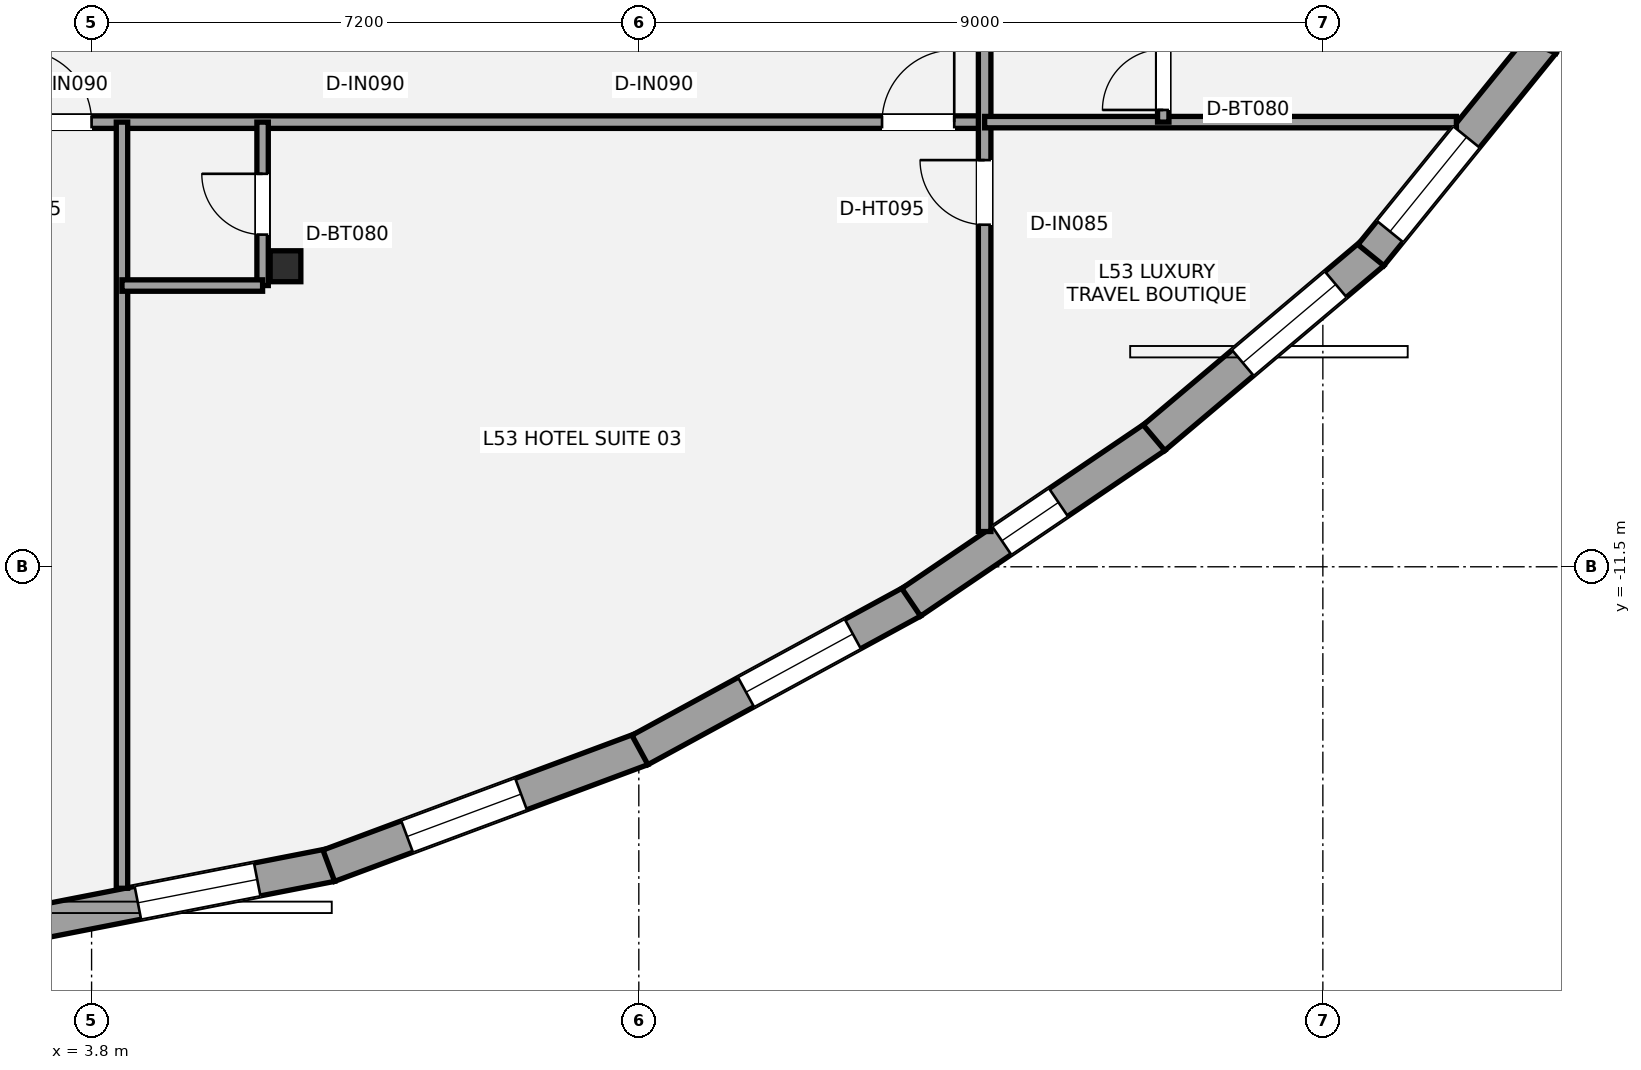
"""IFC4 building model, lengths in metres.
Left out: names, types, materials, properties, quantities, classifications, styles, units other than length and angle.
Written with IfcOpenShell. Run it as: python <this file> out.ifc"""

import sys

from ifc_helpers import new_model, si_unit, direction, frame, frame_2d, origin, origin_2d, place, context, subcontext, project, spatial, rectangle, i_section, extrude, element, fill, save


model = new_model("IFC4")
c1 = context("Model", 3, precision=1e-05, world=origin(), true_north=direction((0.0, 1.0)))
c2 = subcontext(c1, "Body", "Model", "MODEL_VIEW")
j1 = project(units=[si_unit("LENGTHUNIT", "METRE"), si_unit("PLANEANGLEUNIT", "RADIAN")], contexts=[c1])
p1 = place(None, origin())
s1 = spatial("IfcSite", under=j1, at=p1, CompositionType="ELEMENT")
p2 = place(p1, origin())
s2 = spatial("IfcBuilding", under=s1, at=p2, CompositionType="ELEMENT")
p3 = place(p2, frame((0.0, 0.0, 191.8)))
s3 = spatial("IfcBuildingStorey", under=s2, at=p3, CompositionType="ELEMENT", Elevation=191.8)
p4 = place(p3, frame((6.351, -7.546, 0.0), z_axis=(0.0, 0.0, 1.0), x_axis=(1.0, 0.0, 0.0)))
e1 = element("IfcColumn", 1, at=p4, inside=s3, PredefinedType="COLUMN", context=c2, shape_type="SweptSolid", body=[
    extrude(i_section(OverallWidth=0.404, OverallDepth=0.407, WebThickness=0.027, FlangeThickness=0.044, at=origin_2d()), origin(), (0.0, 0.0, 1.0), 3.2),
])
p5 = place(p3, frame((6.955, -15.423, 0.0), z_axis=(0.0, 0.0, 1.0), x_axis=(-0.981406109785, -0.191942823979, 0.0)))
e2 = element("IfcWall", 2, at=p5, inside=s3, PredefinedType="STANDARD", context=c2, shape_type="SweptSolid", body=[
    extrude(rectangle(XDim=4.682, YDim=0.44, at=frame_2d((2.341, 0.0))), origin(), (0.0, 0.0, 1.0), 2.315),
])
p6 = place(p5, frame((0.995, 0.0, 0.58)))
e3 = element("IfcOpeningElement", 3, at=p6, cuts=e2, PredefinedType="OPENING", context=c2, shape_type="SweptSolid", body=[
    extrude(rectangle(XDim=1.6, YDim=1.55, at=frame_2d((0.8, 0.775))), frame((0.0, 0.23, 0.0), z_axis=(0.0, -1.0, 0.0), x_axis=(1.0, 0.0, 0.0)), (0.0, 0.0, 1.0), 0.46),
])
p7 = place(p3, frame((11.042, -13.897, 0.0), z_axis=(0.0, 0.0, 1.0), x_axis=(-0.937088879832, -0.349090863953, 0.0)))
e4 = element("IfcWall", 4, at=p7, inside=s3, PredefinedType="STANDARD", context=c2, shape_type="SweptSolid", body=[
    extrude(rectangle(XDim=4.398, YDim=0.44, at=frame_2d((2.199, 0.0))), origin(), (0.0, 0.0, 1.0), 2.315),
])
p8 = place(p7, frame((1.699, 0.0, 0.58)))
e5 = element("IfcOpeningElement", 5, at=p8, cuts=e4, PredefinedType="OPENING", context=c2, shape_type="SweptSolid", body=[
    extrude(rectangle(XDim=1.6, YDim=1.55, at=frame_2d((0.8, 0.775))), frame((0.0, 0.23, 0.0), z_axis=(0.0, -1.0, 0.0), x_axis=(1.0, 0.0, 0.0)), (0.0, 0.0, 1.0), 0.46),
])
p9 = place(p3, frame((14.602, -11.956, 0.0), z_axis=(0.0, 0.0, 1.0), x_axis=(-0.878158075839, -0.478370561217, 0.0)))
e6 = element("IfcWall", 6, at=p9, inside=s3, PredefinedType="STANDARD", context=c2, shape_type="SweptSolid", body=[
    extrude(rectangle(XDim=4.085, YDim=0.44, at=frame_2d((2.043, 0.0))), origin(), (0.0, 0.0, 1.0), 2.315),
])
p10 = place(p9, frame((0.895, 0.0, 0.58)))
e7 = element("IfcOpeningElement", 7, at=p10, cuts=e6, PredefinedType="OPENING", context=c2, shape_type="SweptSolid", body=[
    extrude(rectangle(XDim=1.6, YDim=1.55, at=frame_2d((0.8, 0.775))), frame((0.0, 0.23, 0.0), z_axis=(0.0, -1.0, 0.0), x_axis=(1.0, 0.0, 0.0)), (0.0, 0.0, 1.0), 0.46),
])
p11 = place(p3, frame((17.797, -9.788, 0.0), z_axis=(0.0, 0.0, 1.0), x_axis=(-0.827690675663, -0.561184591218, 0.0)))
e8 = element("IfcWall", 8, at=p11, inside=s3, PredefinedType="STANDARD", context=c2, shape_type="SweptSolid", body=[
    extrude(rectangle(XDim=3.882, YDim=0.44, at=frame_2d((1.941, 0.0))), origin(), (0.0, 0.0, 1.0), 2.315),
])
p12 = place(p11, frame((1.541, 0.0, 0.58)))
e9 = element("IfcOpeningElement", 9, at=p12, cuts=e8, PredefinedType="OPENING", context=c2, shape_type="SweptSolid", body=[
    extrude(rectangle(XDim=0.9, YDim=1.35, at=frame_2d((0.45, 0.675))), frame((0.0, 0.23, 0.0), z_axis=(0.0, -1.0, 0.0), x_axis=(1.0, 0.0, 0.0)), (0.0, 0.0, 1.0), 0.46),
])
p13 = place(p3, frame((20.661, -7.37, 0.0), z_axis=(0.0, 0.0, 1.0), x_axis=(-0.764269547527, -0.644896936512, 0.0)))
e10 = element("IfcWall", 10, at=p13, inside=s3, PredefinedType="STANDARD", context=c2, shape_type="SweptSolid", body=[
    extrude(rectangle(XDim=3.771, YDim=0.44, at=frame_2d((1.886, 0.0))), origin(), (0.0, 0.0, 1.0), 2.315),
])
p14 = place(p13, frame((0.643, 0.0, 0.58)))
e11 = element("IfcOpeningElement", 11, at=p14, cuts=e10, PredefinedType="OPENING", context=c2, shape_type="SweptSolid", body=[
    extrude(rectangle(XDim=1.6, YDim=1.55, at=frame_2d((0.8, 0.775))), frame((0.0, 0.23, 0.0), z_axis=(0.0, -1.0, 0.0), x_axis=(1.0, 0.0, 0.0)), (0.0, 0.0, 1.0), 0.46),
])
p15 = place(p3, frame((22.897, -4.605, 0.0), z_axis=(0.0, 0.0, 1.0), x_axis=(-0.629697919329, -0.776840093193, 0.0)))
e12 = element("IfcWall", 12, at=p15, inside=s3, PredefinedType="STANDARD", context=c2, shape_type="SweptSolid", body=[
    extrude(rectangle(XDim=3.597, YDim=0.44, at=frame_2d((1.799, 0.0))), origin(), (0.0, 0.0, 1.0), 2.315),
])
p16 = place(p15, frame((1.597, 0.0, 0.58)))
e13 = element("IfcOpeningElement", 13, at=p16, cuts=e12, PredefinedType="OPENING", context=c2, shape_type="SweptSolid", body=[
    extrude(rectangle(XDim=1.6, YDim=1.55, at=frame_2d((0.8, 0.775))), frame((0.0, 0.23, 0.0), z_axis=(0.0, -1.0, 0.0), x_axis=(1.0, 0.0, 0.0)), (0.0, 0.0, 1.0), 0.46),
])
p17 = place(p3, frame((24.191, -1.543, 0.0), z_axis=(0.0, 0.0, 1.0), x_axis=(-0.391568154721, -0.920149107595, 0.0)))
e14 = element("IfcWall", 14, at=p17, inside=s3, PredefinedType="STANDARD", context=c2, shape_type="SweptSolid", body=[
    extrude(rectangle(XDim=3.385, YDim=0.44, at=frame_2d((1.693, 0.0))), origin(), (0.0, 0.0, 1.0), 2.315),
])
p18 = place(p17, frame((0.398, 0.0, 0.58)))
e15 = element("IfcOpeningElement", 15, at=p18, cuts=e14, PredefinedType="OPENING", context=c2, shape_type="SweptSolid", body=[
    extrude(rectangle(XDim=1.6, YDim=1.55, at=frame_2d((0.8, 0.775))), frame((0.0, 0.23, 0.0), z_axis=(0.0, -1.0, 0.0), x_axis=(1.0, 0.0, 0.0)), (0.0, 0.0, 1.0), 0.46),
])
p19 = place(p3, frame((-16.1, -5.65, 0.0), z_axis=(0.0, 0.0, 1.0), x_axis=(1.0, 0.0, 0.0)))
e16 = element("IfcWall", 16, at=p19, inside=s3, PredefinedType="PARTITIONING", context=c2, shape_type="SweptSolid", body=[
    extrude(rectangle(XDim=31.65, YDim=0.165, at=frame_2d((15.825, 0.0))), origin(), (0.0, 0.0, 1.0), 2.398),
])
p20 = place(p19, frame((8.95, 0.0, 0.0)))
e17 = element("IfcOpeningElement", 17, at=p20, cuts=e16, PredefinedType="OPENING", context=c2, shape_type="SweptSolid", body=[
    extrude(rectangle(XDim=0.95, YDim=2.15, at=frame_2d((0.475, 1.075))), frame((0.0, 0.093, 0.0), z_axis=(0.0, -1.0, 0.0), x_axis=(1.0, 0.0, 0.0)), (0.0, 0.0, 1.0), 0.185),
])
p21 = place(p19, frame((18.95, 0.0, 0.0)))
e18 = element("IfcOpeningElement", 18, at=p21, cuts=e16, PredefinedType="OPENING", context=c2, shape_type="SweptSolid", body=[
    extrude(rectangle(XDim=0.95, YDim=2.15, at=frame_2d((0.475, 1.075))), frame((0.0, 0.093, 0.0), z_axis=(0.0, -1.0, 0.0), x_axis=(1.0, 0.0, 0.0)), (0.0, 0.0, 1.0), 0.185),
])
p22 = place(p19, frame((30.3, 0.0, 0.0)))
e19 = element("IfcOpeningElement", 19, at=p22, cuts=e16, PredefinedType="OPENING", context=c2, shape_type="SweptSolid", body=[
    extrude(rectangle(XDim=0.95, YDim=2.15, at=frame_2d((0.475, 1.075))), frame((0.0, 0.093, 0.0), z_axis=(0.0, -1.0, 0.0), x_axis=(1.0, 0.0, 0.0)), (0.0, 0.0, 1.0), 0.185),
])
p23 = place(p3, frame((15.55, -11.036, 0.0), z_axis=(0.0, 0.0, 1.0), x_axis=(0.0, 1.0, 0.0)))
e20 = element("IfcWall", 20, at=p23, inside=s3, PredefinedType="PARTITIONING", context=c2, shape_type="SweptSolid", body=[
    extrude(rectangle(XDim=18.586, YDim=0.165, at=frame_2d((9.293, 0.0))), origin(), (0.0, 0.0, 1.0), 2.473),
])
p24 = place(p23, frame((4.037, 0.0, 0.0)))
e21 = element("IfcOpeningElement", 21, at=p24, cuts=e20, PredefinedType="OPENING", context=c2, shape_type="SweptSolid", body=[
    extrude(rectangle(XDim=0.85, YDim=2.1, at=frame_2d((0.425, 1.05))), frame((0.0, 0.093, 0.0), z_axis=(0.0, -1.0, 0.0), x_axis=(1.0, 0.0, 0.0)), (0.0, 0.0, 1.0), 0.185),
])
p25 = place(p23, frame((8.086, 0.0, 0.0)))
e22 = element("IfcOpeningElement", 22, at=p25, cuts=e20, PredefinedType="OPENING", context=c2, shape_type="SweptSolid", body=[
    extrude(rectangle(XDim=0.95, YDim=2.15, at=frame_2d((0.475, 1.075))), frame((0.0, 0.093, 0.0), z_axis=(0.0, -1.0, 0.0), x_axis=(1.0, 0.0, 0.0)), (0.0, 0.0, 1.0), 0.185),
])
p26 = place(p23, frame((12.487, 0.0, 0.0)))
e23 = element("IfcOpeningElement", 23, at=p26, cuts=e20, PredefinedType="OPENING", context=c2, shape_type="SweptSolid", body=[
    extrude(rectangle(XDim=0.95, YDim=2.15, at=frame_2d((0.475, 1.075))), frame((0.0, 0.093, 0.0), z_axis=(0.0, -1.0, 0.0), x_axis=(1.0, 0.0, 0.0)), (0.0, 0.0, 1.0), 0.185),
])
p27 = place(p23, frame((17.237, 0.0, 0.0)))
e24 = element("IfcOpeningElement", 24, at=p27, cuts=e20, PredefinedType="OPENING", context=c2, shape_type="SweptSolid", body=[
    extrude(rectangle(XDim=0.95, YDim=2.15, at=frame_2d((0.475, 1.075))), frame((0.0, 0.093, 0.0), z_axis=(0.0, -1.0, 0.0), x_axis=(1.0, 0.0, 0.0)), (0.0, 0.0, 1.0), 0.185),
])
p28 = place(p3, frame((15.55, -5.65, 0.0), z_axis=(0.0, 0.0, 1.0), x_axis=(1.0, 0.0, 0.0)))
e25 = element("IfcWall", 25, at=p28, inside=s3, PredefinedType="PLUMBINGWALL", context=c2, shape_type="SweptSolid", body=[
    extrude(rectangle(XDim=6.207, YDim=0.15, at=frame_2d((3.104, 0.0))), origin(), (0.0, 0.0, 1.0), 2.473),
])
p29 = place(p3, frame((4.2, -15.729, 0.0), z_axis=(0.0, 0.0, 1.0), x_axis=(0.0, 1.0, 0.0)))
e26 = element("IfcWall", 26, at=p29, inside=s3, PredefinedType="PLUMBINGWALL", context=c2, shape_type="SweptSolid", body=[
    extrude(rectangle(XDim=10.08, YDim=0.15, at=frame_2d((5.04, 0.0))), origin(), (0.0, 0.0, 1.0), 2.473),
])
p30 = place(p3, frame((6.05, -7.8, 0.0), z_axis=(0.0, 0.0, 1.0), x_axis=(0.0, 1.0, 0.0)))
e27 = element("IfcWall", 27, at=p30, inside=s3, PredefinedType="PLUMBINGWALL", context=c2, shape_type="SweptSolid", body=[
    extrude(rectangle(XDim=2.15, YDim=0.15, at=frame_2d((1.075, 0.0))), origin(), (0.0, 0.0, 1.0), 2.473),
])
p31 = place(p30, frame((0.67, 0.0, 0.0)))
e28 = element("IfcOpeningElement", 28, at=p31, cuts=e27, PredefinedType="OPENING", context=c2, shape_type="SweptSolid", body=[
    extrude(rectangle(XDim=0.8, YDim=2.1, at=frame_2d((0.4, 1.05))), frame((0.0, 0.085, 0.0), z_axis=(0.0, -1.0, 0.0), x_axis=(1.0, 0.0, 0.0)), (0.0, 0.0, 1.0), 0.17),
])
p32 = place(p3, frame((4.2, -7.8, 0.0), z_axis=(0.0, 0.0, 1.0), x_axis=(1.0, 0.0, 0.0)))
e29 = element("IfcWall", 29, at=p32, inside=s3, PredefinedType="PLUMBINGWALL", context=c2, shape_type="SweptSolid", body=[
    extrude(rectangle(XDim=1.85, YDim=0.15, at=frame_2d((0.925, 0.0))), origin(), (0.0, 0.0, 1.0), 3.02),
])
p33 = place(p3, frame((17.9, -5.65, 0.0), z_axis=(0.0, 0.0, 1.0), x_axis=(0.0, 1.0, 0.0)))
e30 = element("IfcWall", 30, at=p33, inside=s3, PredefinedType="PLUMBINGWALL", context=c2, shape_type="SweptSolid", body=[
    extrude(rectangle(XDim=2.15, YDim=0.15, at=frame_2d((1.075, 0.0))), origin(), (0.0, 0.0, 1.0), 2.473),
])
p34 = place(p33, frame((0.16, 0.0, 0.0)))
e31 = element("IfcOpeningElement", 31, at=p34, cuts=e30, PredefinedType="OPENING", context=c2, shape_type="SweptSolid", body=[
    extrude(rectangle(XDim=0.8, YDim=2.1, at=frame_2d((0.4, 1.05))), frame((0.0, 0.085, 0.0), z_axis=(0.0, -1.0, 0.0), x_axis=(1.0, 0.0, 0.0)), (0.0, 0.0, 1.0), 0.17),
])
p35 = place(p6, origin())
e32 = element("IfcWindow", 32, at=p35, inside=s3, PartitioningType="SINGLE_PANEL", PredefinedType="WINDOW", context=c2, shape_type="SweptSolid", body=[
    extrude(rectangle(XDim=1.6, YDim=1.55, at=frame_2d((0.8, 0.775))), frame((0.0, -0.01, 0.0), z_axis=(0.0, -1.0, 0.0), x_axis=(1.0, 0.0, 0.0)), (0.0, 0.0, 1.0), 0.06),
])
fill(e3, e32)
p36 = place(p8, origin())
e33 = element("IfcWindow", 33, at=p36, inside=s3, PartitioningType="SINGLE_PANEL", PredefinedType="WINDOW", context=c2, shape_type="SweptSolid", body=[
    extrude(rectangle(XDim=1.6, YDim=1.55, at=frame_2d((0.8, 0.775))), frame((0.0, -0.01, 0.0), z_axis=(0.0, -1.0, 0.0), x_axis=(1.0, 0.0, 0.0)), (0.0, 0.0, 1.0), 0.06),
])
fill(e5, e33)
p37 = place(p10, origin())
e34 = element("IfcWindow", 34, at=p37, inside=s3, PartitioningType="SINGLE_PANEL", PredefinedType="WINDOW", context=c2, shape_type="SweptSolid", body=[
    extrude(rectangle(XDim=1.6, YDim=1.55, at=frame_2d((0.8, 0.775))), frame((0.0, -0.01, 0.0), z_axis=(0.0, -1.0, 0.0), x_axis=(1.0, 0.0, 0.0)), (0.0, 0.0, 1.0), 0.06),
])
fill(e7, e34)
p38 = place(p12, origin())
e35 = element("IfcWindow", 35, at=p38, inside=s3, PartitioningType="SINGLE_PANEL", PredefinedType="WINDOW", context=c2, shape_type="SweptSolid", body=[
    extrude(rectangle(XDim=0.9, YDim=1.35, at=frame_2d((0.45, 0.675))), frame((0.0, -0.01, 0.0), z_axis=(0.0, -1.0, 0.0), x_axis=(1.0, 0.0, 0.0)), (0.0, 0.0, 1.0), 0.06),
])
fill(e9, e35)
p39 = place(p14, origin())
e36 = element("IfcWindow", 36, at=p39, inside=s3, PartitioningType="SINGLE_PANEL", PredefinedType="WINDOW", context=c2, shape_type="SweptSolid", body=[
    extrude(rectangle(XDim=1.6, YDim=1.55, at=frame_2d((0.8, 0.775))), frame((0.0, -0.01, 0.0), z_axis=(0.0, -1.0, 0.0), x_axis=(1.0, 0.0, 0.0)), (0.0, 0.0, 1.0), 0.06),
])
fill(e11, e36)
p40 = place(p16, origin())
e37 = element("IfcWindow", 37, at=p40, inside=s3, PartitioningType="SINGLE_PANEL", PredefinedType="WINDOW", context=c2, shape_type="SweptSolid", body=[
    extrude(rectangle(XDim=1.6, YDim=1.55, at=frame_2d((0.8, 0.775))), frame((0.0, -0.01, 0.0), z_axis=(0.0, -1.0, 0.0), x_axis=(1.0, 0.0, 0.0)), (0.0, 0.0, 1.0), 0.06),
])
fill(e13, e37)
p41 = place(p24, origin())
e38 = element("IfcDoor", 38, at=p41, inside=s3, OperationType="SINGLE_SWING_RIGHT", PredefinedType="DOOR", context=c2, shape_type="SweptSolid", body=[
    extrude(rectangle(XDim=0.85, YDim=2.1, at=frame_2d((0.425, 1.05))), frame((0.0, 0.025, 0.0), z_axis=(0.0, -1.0, 0.0), x_axis=(1.0, 0.0, 0.0)), (0.0, 0.0, 1.0), 0.05),
])
fill(e21, e38)
p42 = place(p21, origin())
e39 = element("IfcDoor", 39, at=p42, inside=s3, OperationType="SINGLE_SWING_LEFT", PredefinedType="DOOR", context=c2, shape_type="SweptSolid", body=[
    extrude(rectangle(XDim=0.95, YDim=2.15, at=frame_2d((0.475, 1.075))), frame((0.0, 0.025, 0.0), z_axis=(0.0, -1.0, 0.0), x_axis=(1.0, 0.0, 0.0)), (0.0, 0.0, 1.0), 0.05),
])
fill(e18, e39)
p43 = place(p22, origin())
e40 = element("IfcDoor", 40, at=p43, inside=s3, OperationType="SINGLE_SWING_RIGHT", PredefinedType="DOOR", context=c2, shape_type="SweptSolid", body=[
    extrude(rectangle(XDim=0.95, YDim=2.15, at=frame_2d((0.475, 1.075))), frame((0.0, 0.025, 0.0), z_axis=(0.0, -1.0, 0.0), x_axis=(1.0, 0.0, 0.0)), (0.0, 0.0, 1.0), 0.05),
])
fill(e19, e40)
p44 = place(p31, origin())
e41 = element("IfcDoor", 41, at=p44, inside=s3, OperationType="SINGLE_SWING_RIGHT", PredefinedType="DOOR", context=c2, shape_type="SweptSolid", body=[
    extrude(rectangle(XDim=0.8, YDim=2.1, at=frame_2d((0.4, 1.05))), frame((0.0, 0.025, 0.0), z_axis=(0.0, -1.0, 0.0), x_axis=(1.0, 0.0, 0.0)), (0.0, 0.0, 1.0), 0.05),
])
fill(e28, e41)
p45 = place(p34, origin())
e42 = element("IfcDoor", 42, at=p45, inside=s3, OperationType="SINGLE_SWING_LEFT", PredefinedType="DOOR", context=c2, shape_type="SweptSolid", body=[
    extrude(rectangle(XDim=0.8, YDim=2.1, at=frame_2d((0.4, 1.05))), frame((0.0, 0.025, 0.0), z_axis=(0.0, -1.0, 0.0), x_axis=(1.0, 0.0, 0.0)), (0.0, 0.0, 1.0), 0.05),
])
fill(e31, e42)
save(model, sys.argv[1])
